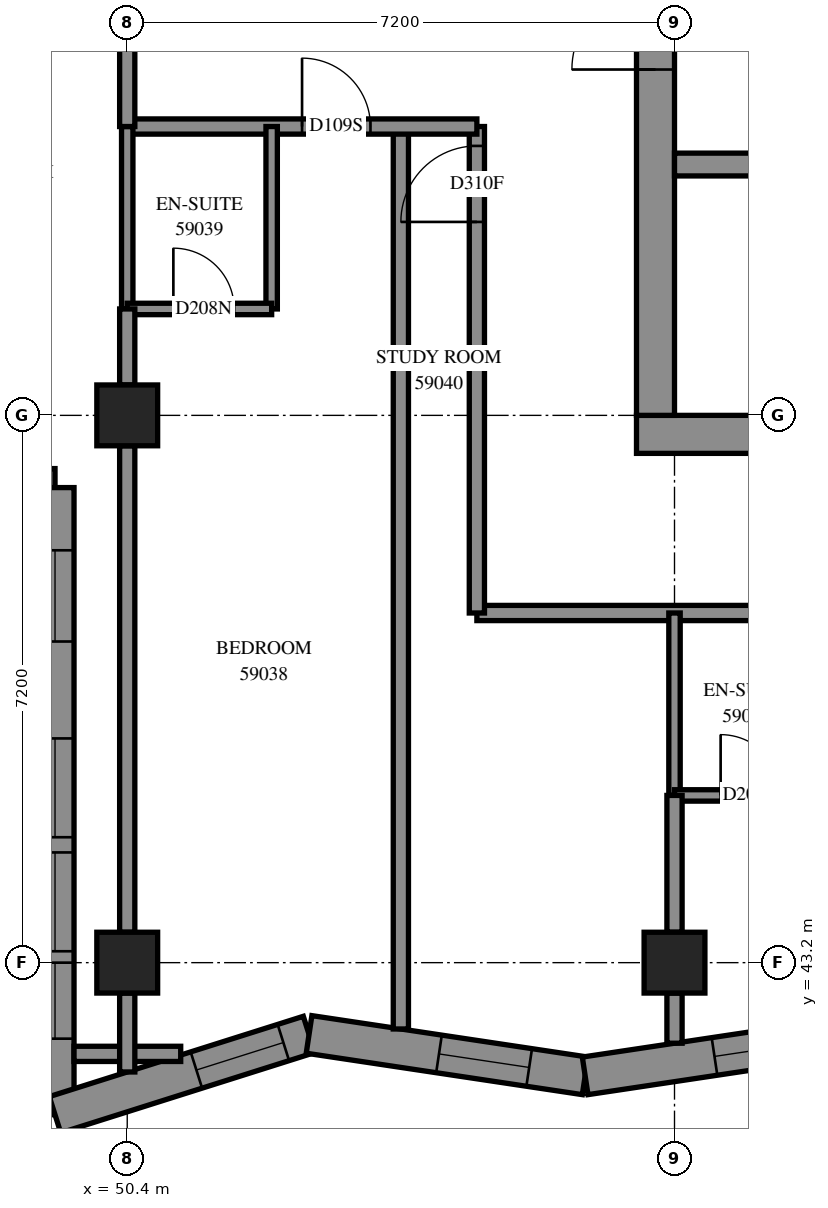
"""IFC4 building model, lengths in metres.
Left out: names, types, materials, properties, quantities, classifications, styles, units other than length and angle.
Written with IfcOpenShell. Run it as: python <this file> out.ifc"""

import sys

from ifc_helpers import new_model, si_unit, direction, frame, frame_2d, origin, origin_2d, place, context, subcontext, project, spatial, polyline, rectangle, outline, extrude, element, fill, save


model = new_model("IFC4")
c1 = context("Model", 3, precision=1e-05, world=origin(), true_north=direction((0.0, 1.0)))
c2 = subcontext(c1, "Body", "Model", "MODEL_VIEW")
j1 = project(units=[si_unit("LENGTHUNIT", "METRE"), si_unit("PLANEANGLEUNIT", "RADIAN")], contexts=[c1])
p1 = place(None, origin())
s1 = spatial("IfcSite", under=j1, at=p1, CompositionType="ELEMENT")
p2 = place(p1, origin())
s2 = spatial("IfcBuilding", under=s1, at=p2, CompositionType="ELEMENT")
p3 = place(p2, frame((0.0, 0.0, 216.8)))
s3 = spatial("IfcBuildingStorey", under=s2, at=p3, CompositionType="ELEMENT", Elevation=216.8)
for number, where, z_axis, x_axis in (
    (1, (50.4, 43.2, 0.0), (0.0, 0.0, 1.0), (1.0, 0.0, 0.0)),
    (2, (50.4, 50.4, 0.0), (0.0, 0.0, 1.0), (1.0, 0.0, 0.0)),
    (3, (57.6, 43.2, 0.0), (0.0, 0.0, 1.0), (1.0, 0.0, 0.0)),
):
    element("IfcColumn", number, at=place(p3, frame(where, z_axis=z_axis, x_axis=x_axis)), inside=s3, PredefinedType="COLUMN", context=c2, shape_type="SweptSolid", body=[
        extrude(rectangle(XDim=0.8, YDim=0.8, at=origin_2d()), origin(), (0.0, 0.0, 1.0), 3.1),
    ])
p4 = place(p3, frame((57.1, 50.15, -0.3), z_axis=(0.0, 0.0, 1.0), x_axis=(1.0, 0.0, 0.0)))
e4 = element("IfcWall", 4, at=p4, inside=s3, PredefinedType="SHEAR", context=c2, shape_type="SweptSolid", body=[
    extrude(rectangle(XDim=15.4, YDim=0.5, at=frame_2d((7.7, 0.0))), origin(), (0.0, 0.0, 1.0), 2.7),
])
p5 = place(p3, frame((57.35, 50.4, -0.3), z_axis=(0.0, 0.0, 1.0), x_axis=(0.0, 1.0, 0.0)))
e5 = element("IfcWall", 5, at=p5, inside=s3, PredefinedType="SHEAR", context=c2, shape_type="SweptSolid", body=[
    extrude(rectangle(XDim=14.4, YDim=0.5, at=frame_2d((7.2, 0.0))), origin(), (0.0, 0.0, 1.0), 2.7),
])
p6 = place(p5, frame((4.55, 0.0, 0.3)))
e6 = element("IfcOpeningElement", 6, at=p6, cuts=e5, PredefinedType="OPENING", context=c2, shape_type="SweptSolid", body=[
    extrude(rectangle(XDim=1.1, YDim=2.1, at=frame_2d((0.55, 1.05))), frame((0.0, 0.26, 0.0), z_axis=(0.0, -1.0, 0.0), x_axis=(1.0, 0.0, 0.0)), (0.0, 0.0, 1.0), 0.52),
])
p7 = place(p5, frame((11.35, 0.0, 0.3)))
e7 = element("IfcOpeningElement", 7, at=p7, cuts=e5, PredefinedType="OPENING", context=c2, shape_type="SweptSolid", body=[
    extrude(rectangle(XDim=1.1, YDim=2.1, at=frame_2d((0.55, 1.05))), frame((0.0, 0.26, 0.0), z_axis=(0.0, -1.0, 0.0), x_axis=(1.0, 0.0, 0.0)), (0.0, 0.0, 1.0), 0.52),
])
p8 = place(p3, frame((57.6, 53.7, 0.0), z_axis=(0.0, 0.0, 1.0), x_axis=(1.0, 0.0, 0.0)))
e8 = element("IfcWall", 8, at=p8, inside=s3, PredefinedType="SOLIDWALL", context=c2, shape_type="SweptSolid", body=[
    extrude(rectangle(XDim=14.4, YDim=0.3, at=frame_2d((7.2, 0.0))), origin(), (0.0, 0.0, 1.0), 3.1),
])
p9 = place(p8, frame((1.35, 0.0, 0.0)))
e9 = element("IfcOpeningElement", 9, at=p9, cuts=e8, PredefinedType="OPENING", context=c2, shape_type="SweptSolid", body=[
    extrude(rectangle(XDim=0.9, YDim=2.1, at=frame_2d((0.45, 1.05))), frame((0.0, 0.16, 0.0), z_axis=(0.0, -1.0, 0.0), x_axis=(1.0, 0.0, 0.0)), (0.0, 0.0, 1.0), 0.32),
])
p10 = place(p8, frame((4.95, 0.0, 0.0)))
e10 = element("IfcOpeningElement", 10, at=p10, cuts=e8, PredefinedType="OPENING", context=c2, shape_type="SweptSolid", body=[
    extrude(rectangle(XDim=0.9, YDim=2.1, at=frame_2d((0.45, 1.05))), frame((0.0, 0.16, 0.0), z_axis=(0.0, -1.0, 0.0), x_axis=(1.0, 0.0, 0.0)), (0.0, 0.0, 1.0), 0.32),
])
p11 = place(p8, frame((8.55, 0.0, 0.0)))
e11 = element("IfcOpeningElement", 11, at=p11, cuts=e8, PredefinedType="OPENING", context=c2, shape_type="SweptSolid", body=[
    extrude(rectangle(XDim=0.9, YDim=2.1, at=frame_2d((0.45, 1.05))), frame((0.0, 0.16, 0.0), z_axis=(0.0, -1.0, 0.0), x_axis=(1.0, 0.0, 0.0)), (0.0, 0.0, 1.0), 0.32),
])
p12 = place(p8, frame((12.05, 0.0, 0.0)))
e12 = element("IfcOpeningElement", 12, at=p12, cuts=e8, PredefinedType="OPENING", context=c2, shape_type="SweptSolid", body=[
    extrude(rectangle(XDim=1.1, YDim=2.1, at=frame_2d((0.55, 1.05))), frame((0.0, 0.16, 0.0), z_axis=(0.0, -1.0, 0.0), x_axis=(1.0, 0.0, 0.0)), (0.0, 0.0, 1.0), 0.32),
])
p13 = place(p3, frame((42.25, 49.45, 0.0), z_axis=(0.0, 0.0, 1.0), x_axis=(1.0, 0.0, 0.0)))
e13 = element("IfcWall", 13, at=p13, inside=s3, PredefinedType="SOLIDWALL", context=c2, shape_type="SweptSolid", body=[
    extrude(outline(polyline([(-0.25, -0.25), (6.95, -0.25), (7.45, 0.25), (0.25, 0.25), (-0.25, -0.25)])), origin(), (0.0, 0.0, 1.0), 3.1),
])
p14 = place(p13, frame((1.35, 0.0, 0.45)))
e14 = element("IfcOpeningElement", 14, at=p14, cuts=e13, PredefinedType="OPENING", context=c2, shape_type="SweptSolid", body=[
    extrude(rectangle(XDim=1.3, YDim=2.5, at=frame_2d((0.65, 1.25))), frame((0.0, 0.26, 0.0), z_axis=(0.0, -1.0, 0.0), x_axis=(1.0, 0.0, 0.0)), (0.0, 0.0, 1.0), 0.52),
])
p15 = place(p13, frame((2.85, 0.0, 0.45)))
e15 = element("IfcOpeningElement", 15, at=p15, cuts=e13, PredefinedType="OPENING", context=c2, shape_type="SweptSolid", body=[
    extrude(rectangle(XDim=1.3, YDim=2.5, at=frame_2d((0.65, 1.25))), frame((0.0, 0.26, 0.0), z_axis=(0.0, -1.0, 0.0), x_axis=(1.0, 0.0, 0.0)), (0.0, 0.0, 1.0), 0.52),
])
p16 = place(p13, frame((5.175, 0.0, 0.45)))
e16 = element("IfcOpeningElement", 16, at=p16, cuts=e13, PredefinedType="OPENING", context=c2, shape_type="SweptSolid", body=[
    extrude(rectangle(XDim=1.2, YDim=2.5, at=frame_2d((0.6, 1.25))), frame((0.0, 0.26, 0.0), z_axis=(0.0, -1.0, 0.0), x_axis=(1.0, 0.0, 0.0)), (0.0, 0.0, 1.0), 0.52),
])
p17 = place(p3, frame((49.45, 49.45, 0.0), z_axis=(0.0, 0.0, 1.0), x_axis=(0.0, -1.0, 0.0)))
e17 = element("IfcWall", 17, at=p17, inside=s3, PredefinedType="SOLIDWALL", context=c2, shape_type="SweptSolid", body=[
    extrude(outline(polyline([(0.25, -0.25), (8.592, -0.25), (7.91, 0.25), (-0.25, 0.25), (0.25, -0.25)])), origin(), (0.0, 0.0, 1.0), 3.1),
])
p18 = place(p17, frame((3.3, 0.0, 0.45)))
e18 = element("IfcOpeningElement", 18, at=p18, cuts=e17, PredefinedType="OPENING", context=c2, shape_type="SweptSolid", body=[
    extrude(rectangle(XDim=1.3, YDim=2.5, at=frame_2d((0.65, 1.25))), frame((0.0, 0.26, 0.0), z_axis=(0.0, -1.0, 0.0), x_axis=(1.0, 0.0, 0.0)), (0.0, 0.0, 1.0), 0.52),
])
p19 = place(p17, frame((4.8, 0.0, 0.45)))
e19 = element("IfcOpeningElement", 19, at=p19, cuts=e17, PredefinedType="OPENING", context=c2, shape_type="SweptSolid", body=[
    extrude(rectangle(XDim=1.3, YDim=2.5, at=frame_2d((0.65, 1.25))), frame((0.0, 0.26, 0.0), z_axis=(0.0, -1.0, 0.0), x_axis=(1.0, 0.0, 0.0)), (0.0, 0.0, 1.0), 0.52),
])
p20 = place(p17, frame((0.825, 0.0, 0.45)))
e20 = element("IfcOpeningElement", 20, at=p20, cuts=e17, PredefinedType="OPENING", context=c2, shape_type="SweptSolid", body=[
    extrude(rectangle(XDim=1.2, YDim=2.5, at=frame_2d((0.6, 1.25))), frame((0.0, 0.26, 0.0), z_axis=(0.0, -1.0, 0.0), x_axis=(1.0, 0.0, 0.0)), (0.0, 0.0, 1.0), 0.52),
])
p21 = place(p17, frame((6.25, 0.0, 0.45)))
e21 = element("IfcOpeningElement", 21, at=p21, cuts=e17, PredefinedType="OPENING", context=c2, shape_type="SweptSolid", body=[
    extrude(rectangle(XDim=1.0, YDim=2.5, at=frame_2d((0.5, 1.25))), frame((0.0, 0.26, 0.0), z_axis=(0.0, -1.0, 0.0), x_axis=(1.0, 0.0, 0.0)), (0.0, 0.0, 1.0), 0.52),
])
p22 = place(p3, frame((49.45, 41.199, 0.0), z_axis=(0.0, 0.0, 1.0), x_axis=(0.9534843061, 0.3014426612, 0.0)))
e22 = element("IfcWall", 22, at=p22, inside=s3, PredefinedType="SOLIDWALL", context=c2, shape_type="SweptSolid", body=[
    extrude(outline(polyline([(-0.341, -0.25), (3.447, -0.25), (3.563, 0.25), (0.341, 0.25), (-0.341, -0.25)])), origin(), (0.0, 0.0, 1.0), 3.1),
])
p23 = place(p22, frame((1.951, 0.0, 0.45)))
e23 = element("IfcOpeningElement", 23, at=p23, cuts=e22, PredefinedType="OPENING", context=c2, shape_type="SweptSolid", body=[
    extrude(rectangle(XDim=1.2, YDim=2.5, at=frame_2d((0.6, 1.25))), frame((0.0, 0.26, 0.0), z_axis=(0.0, -1.0, 0.0), x_axis=(1.0, 0.0, 0.0)), (0.0, 0.0, 1.0), 0.52),
])
p24 = place(p3, frame((52.792, 42.256, 0.0), z_axis=(0.0, 0.0, 1.0), x_axis=(0.9889307607, -0.1483777295, 0.0)))
e24 = element("IfcWall", 24, at=p24, inside=s3, PredefinedType="SOLIDWALL", context=c2, shape_type="SweptSolid", body=[
    extrude(outline(polyline([(0.058, -0.25), (3.711, -0.25), (3.635, 0.25), (-0.058, 0.25), (0.058, -0.25)])), origin(), (0.0, 0.0, 1.0), 3.1),
])
p25 = place(p24, frame((1.728, 0.0, 0.45)))
e25 = element("IfcOpeningElement", 25, at=p25, cuts=e24, PredefinedType="OPENING", context=c2, shape_type="SweptSolid", body=[
    extrude(rectangle(XDim=1.2, YDim=2.5, at=frame_2d((0.6, 1.25))), frame((0.0, 0.26, 0.0), z_axis=(0.0, -1.0, 0.0), x_axis=(1.0, 0.0, 0.0)), (0.0, 0.0, 1.0), 0.52),
])
p26 = place(p3, frame((56.425, 41.711, 0.0), z_axis=(0.0, 0.0, 1.0), x_axis=(0.9889295242, 0.1483859704, 0.0)))
e26 = element("IfcWall", 26, at=p26, inside=s3, PredefinedType="SOLIDWALL", context=c2, shape_type="SweptSolid", body=[
    extrude(outline(polyline([(-0.037, -0.25), (3.615, -0.25), (3.69, 0.25), (0.037, 0.25), (-0.037, -0.25)])), origin(), (0.0, 0.0, 1.0), 3.1),
])
p27 = place(p26, frame((1.721, 0.0, 0.45)))
e27 = element("IfcOpeningElement", 27, at=p27, cuts=e26, PredefinedType="OPENING", context=c2, shape_type="SweptSolid", body=[
    extrude(rectangle(XDim=1.2, YDim=2.5, at=frame_2d((0.6, 1.25))), frame((0.0, 0.26, 0.0), z_axis=(0.0, -1.0, 0.0), x_axis=(1.0, 0.0, 0.0)), (0.0, 0.0, 1.0), 0.52),
])
p28 = place(p3, frame((55.0, 47.8, 0.0), z_axis=(0.0, 0.0, 1.0), x_axis=(1.0, 0.0, 0.0)))
e28 = element("IfcWall", 28, at=p28, inside=s3, PredefinedType="PARTITIONING", context=c2, shape_type="SweptSolid", body=[
    extrude(rectangle(XDim=19.266, YDim=0.2, at=frame_2d((9.633, 0.0))), origin(), (0.0, 0.0, 1.0), 3.1),
])
p29 = place(p28, frame((4.9, 0.0, 0.0)))
e29 = element("IfcOpeningElement", 29, at=p29, cuts=e28, PredefinedType="OPENING", context=c2, shape_type="SweptSolid", body=[
    extrude(rectangle(XDim=0.9, YDim=2.1, at=frame_2d((0.45, 1.05))), frame((0.0, 0.11, 0.0), z_axis=(0.0, -1.0, 0.0), x_axis=(1.0, 0.0, 0.0)), (0.0, 0.0, 1.0), 0.22),
])
p30 = place(p28, frame((8.457, 0.0, 0.0)))
e30 = element("IfcOpeningElement", 30, at=p30, cuts=e28, PredefinedType="OPENING", context=c2, shape_type="SweptSolid", body=[
    extrude(rectangle(XDim=0.9, YDim=2.1, at=frame_2d((0.45, 1.05))), frame((0.0, 0.11, 0.0), z_axis=(0.0, -1.0, 0.0), x_axis=(1.0, 0.0, 0.0)), (0.0, 0.0, 1.0), 0.22),
])
p31 = place(p28, frame((13.8, 0.0, 0.0)))
e31 = element("IfcOpeningElement", 31, at=p31, cuts=e28, PredefinedType="OPENING", context=c2, shape_type="SweptSolid", body=[
    extrude(rectangle(XDim=0.9, YDim=2.1, at=frame_2d((0.45, 1.05))), frame((0.0, 0.11, 0.0), z_axis=(0.0, -1.0, 0.0), x_axis=(1.0, 0.0, 0.0)), (0.0, 0.0, 1.0), 0.22),
])
p32 = place(p3, frame((54.0, 42.327, 0.0), z_axis=(0.0, 0.0, 1.0), x_axis=(0.0, 1.0, 0.0)))
e32 = element("IfcWall", 32, at=p32, inside=s3, PredefinedType="PARTITIONING", context=c2, shape_type="SweptSolid", body=[
    extrude(rectangle(XDim=11.873, YDim=0.2, at=frame_2d((5.936, 0.0))), origin(), (0.0, 0.0, 1.0), 3.1),
])
p33 = place(p3, frame((55.0, 47.8, 0.0), z_axis=(0.0, 0.0, 1.0), x_axis=(0.0, 1.0, 0.0)))
e33 = element("IfcWall", 33, at=p33, inside=s3, PredefinedType="PARTITIONING", context=c2, shape_type="SweptSolid", body=[
    extrude(rectangle(XDim=6.4, YDim=0.2, at=frame_2d((3.2, 0.0))), origin(), (0.0, 0.0, 1.0), 3.1),
])
p34 = place(p33, frame((5.145, 0.0, 0.0)))
e34 = element("IfcOpeningElement", 34, at=p34, cuts=e33, PredefinedType="OPENING", context=c2, shape_type="SweptSolid", body=[
    extrude(rectangle(XDim=1.0, YDim=2.1, at=frame_2d((0.5, 1.05))), frame((0.0, 0.11, 0.0), z_axis=(0.0, -1.0, 0.0), x_axis=(1.0, 0.0, 0.0)), (0.0, 0.0, 1.0), 0.22),
])
p35 = place(p3, frame((50.4, 43.6, 0.0), z_axis=(0.0, 0.0, 1.0), x_axis=(0.0, 1.0, 0.0)))
e35 = element("IfcWall", 35, at=p35, inside=s3, PredefinedType="PARTITIONING", context=c2, shape_type="SweptSolid", body=[
    extrude(rectangle(XDim=6.4, YDim=0.2, at=frame_2d((3.2, 0.0))), origin(), (0.0, 0.0, 1.0), 2.6),
])
p36 = place(p3, frame((50.4, 54.2, 0.0), z_axis=(0.0, 0.0, 1.0), x_axis=(1.0, 0.0, 0.0)))
e36 = element("IfcWall", 36, at=p36, inside=s3, PredefinedType="PARTITIONING", context=c2, shape_type="SweptSolid", body=[
    extrude(rectangle(XDim=4.6, YDim=0.2, at=frame_2d((2.3, 0.0))), origin(), (0.0, 0.0, 1.0), 3.1),
])
p37 = place(p36, frame((2.3, 0.0, 0.0)))
e37 = element("IfcOpeningElement", 37, at=p37, cuts=e36, PredefinedType="OPENING", context=c2, shape_type="SweptSolid", body=[
    extrude(rectangle(XDim=0.9, YDim=2.1, at=frame_2d((0.45, 1.05))), frame((0.0, 0.11, 0.0), z_axis=(0.0, -1.0, 0.0), x_axis=(1.0, 0.0, 0.0)), (0.0, 0.0, 1.0), 0.22),
])
for number, where, z_axis, x_axis in (
    (38, (52.3, 51.8, 0.0), (0.0, 0.0, 1.0), (0.0, 1.0, 0.0)),
    (39, (50.4, 51.8, 0.0), (0.0, 0.0, 1.0), (0.0, 1.0, 0.0)),
    (40, (57.6, 45.4, 0.0), (0.0, 0.0, 1.0), (0.0, 1.0, 0.0)),
):
    element("IfcWall", number, at=place(p3, frame(where, z_axis=z_axis, x_axis=x_axis)), inside=s3, PredefinedType="PARTITIONING", context=c2, shape_type="SweptSolid", body=[
        extrude(rectangle(XDim=2.4, YDim=0.15, at=frame_2d((1.2, 0.0))), origin(), (0.0, 0.0, 1.0), 3.1),
    ])
p38 = place(p3, frame((50.4, 54.2, 0.0), z_axis=(0.0, 0.0, 1.0), x_axis=(0.0, 1.0, 0.0)))
e41 = element("IfcWall", 41, at=p38, inside=s3, PredefinedType="PARTITIONING", context=c2, shape_type="SweptSolid", body=[
    extrude(rectangle(XDim=2.0, YDim=0.2, at=frame_2d((1.0, 0.0))), origin(), (0.0, 0.0, 1.0), 3.1),
])
p39 = place(p3, frame((50.4, 51.8, 0.0), z_axis=(0.0, 0.0, 1.0), x_axis=(1.0, 0.0, 0.0)))
e42 = element("IfcWall", 42, at=p39, inside=s3, PredefinedType="PARTITIONING", context=c2, shape_type="SweptSolid", body=[
    extrude(rectangle(XDim=1.9, YDim=0.15, at=frame_2d((0.95, 0.0))), origin(), (0.0, 0.0, 1.0), 3.1),
])
p40 = place(p39, frame((0.607, 0.0, 0.0)))
e43 = element("IfcOpeningElement", 43, at=p40, cuts=e42, PredefinedType="OPENING", context=c2, shape_type="SweptSolid", body=[
    extrude(rectangle(XDim=0.8, YDim=2.1, at=frame_2d((0.4, 1.05))), frame((0.0, 0.085, 0.0), z_axis=(0.0, -1.0, 0.0), x_axis=(1.0, 0.0, 0.0)), (0.0, 0.0, 1.0), 0.17),
])
p41 = place(p3, frame((57.6, 45.4, 0.0), z_axis=(0.0, 0.0, 1.0), x_axis=(1.0, 0.0, 0.0)))
e44 = element("IfcWall", 44, at=p41, inside=s3, PredefinedType="PARTITIONING", context=c2, shape_type="SweptSolid", body=[
    extrude(rectangle(XDim=1.9, YDim=0.15, at=frame_2d((0.95, 0.0))), origin(), (0.0, 0.0, 1.0), 3.1),
])
p42 = place(p41, frame((0.607, 0.0, 0.0)))
e45 = element("IfcOpeningElement", 45, at=p42, cuts=e44, PredefinedType="OPENING", context=c2, shape_type="SweptSolid", body=[
    extrude(rectangle(XDim=0.8, YDim=2.1, at=frame_2d((0.4, 1.05))), frame((0.0, 0.085, 0.0), z_axis=(0.0, -1.0, 0.0), x_axis=(1.0, 0.0, 0.0)), (0.0, 0.0, 1.0), 0.17),
])
p43 = place(p3, frame((57.6, 43.6, 0.0), z_axis=(0.0, 0.0, 1.0), x_axis=(0.0, 1.0, 0.0)))
e46 = element("IfcWall", 46, at=p43, inside=s3, PredefinedType="PARTITIONING", context=c2, shape_type="SweptSolid", body=[
    extrude(rectangle(XDim=1.8, YDim=0.2, at=frame_2d((0.9, 0.0))), origin(), (0.0, 0.0, 1.0), 3.1),
])
p44 = place(p3, frame((49.7, 42.0, 0.0), z_axis=(0.0, 0.0, 1.0), x_axis=(1.0, 0.0, 0.0)))
e47 = element("IfcWall", 47, at=p44, inside=s3, PredefinedType="PARTITIONING", context=c2, shape_type="SweptSolid", body=[
    extrude(rectangle(XDim=1.403, YDim=0.2, at=frame_2d((0.702, 0.0))), origin(), (0.0, 0.0, 1.0), 3.1),
])
p45 = place(p3, frame((50.4, 50.8, 0.0), z_axis=(0.0, 0.0, 1.0), x_axis=(0.0, 1.0, 0.0)))
e48 = element("IfcWall", 48, at=p45, inside=s3, PredefinedType="PARTITIONING", context=c2, shape_type="SweptSolid", body=[
    extrude(rectangle(XDim=1.0, YDim=0.2, at=frame_2d((0.5, 0.0))), origin(), (0.0, 0.0, 1.0), 3.1),
])
p46 = place(p3, frame((50.4, 41.762, 0.0), z_axis=(0.0, 0.0, 1.0), x_axis=(0.0, 1.0, 0.0)))
e49 = element("IfcWall", 49, at=p46, inside=s3, PredefinedType="PARTITIONING", context=c2, shape_type="SweptSolid", body=[
    extrude(rectangle(XDim=1.038, YDim=0.2, at=frame_2d((0.519, 0.0))), origin(), (0.0, 0.0, 1.0), 3.1),
])
p47 = place(p3, frame((57.6, 42.14, 0.0), z_axis=(0.0, 0.0, 1.0), x_axis=(0.0, 1.0, 0.0)))
e50 = element("IfcWall", 50, at=p47, inside=s3, PredefinedType="PARTITIONING", context=c2, shape_type="SweptSolid", body=[
    extrude(rectangle(XDim=0.66, YDim=0.2, at=frame_2d((0.33, 0.0))), origin(), (0.0, 0.0, 1.0), 3.1),
])
p48 = place(p18, origin())
e51 = element("IfcWindow", 51, at=p48, inside=s3, PartitioningType="SINGLE_PANEL", PredefinedType="WINDOW", context=c2, shape_type="SweptSolid", body=[
    extrude(rectangle(XDim=1.3, YDim=2.5, at=frame_2d((0.65, 1.25))), frame((0.0, 0.18, 0.0), z_axis=(0.0, -1.0, 0.0), x_axis=(1.0, 0.0, 0.0)), (0.0, 0.0, 1.0), 0.06),
])
fill(e18, e51)
p49 = place(p19, origin())
e52 = element("IfcWindow", 52, at=p49, inside=s3, PartitioningType="SINGLE_PANEL", PredefinedType="WINDOW", context=c2, shape_type="SweptSolid", body=[
    extrude(rectangle(XDim=1.3, YDim=2.5, at=frame_2d((0.65, 1.25))), frame((0.0, 0.18, 0.0), z_axis=(0.0, -1.0, 0.0), x_axis=(1.0, 0.0, 0.0)), (0.0, 0.0, 1.0), 0.06),
])
fill(e19, e52)
p50 = place(p20, origin())
e53 = element("IfcWindow", 53, at=p50, inside=s3, PartitioningType="SINGLE_PANEL", PredefinedType="WINDOW", context=c2, shape_type="SweptSolid", body=[
    extrude(rectangle(XDim=1.2, YDim=2.5, at=frame_2d((0.6, 1.25))), frame((0.0, 0.18, 0.0), z_axis=(0.0, -1.0, 0.0), x_axis=(1.0, 0.0, 0.0)), (0.0, 0.0, 1.0), 0.06),
])
fill(e20, e53)
p51 = place(p23, origin())
e54 = element("IfcWindow", 54, at=p51, inside=s3, PartitioningType="SINGLE_PANEL", PredefinedType="WINDOW", context=c2, shape_type="SweptSolid", body=[
    extrude(rectangle(XDim=1.2, YDim=2.5, at=frame_2d((0.6, 1.25))), frame((0.0, 0.18, 0.0), z_axis=(0.0, -1.0, 0.0), x_axis=(1.0, 0.0, 0.0)), (0.0, 0.0, 1.0), 0.06),
])
fill(e23, e54)
p52 = place(p25, origin())
e55 = element("IfcWindow", 55, at=p52, inside=s3, PartitioningType="SINGLE_PANEL", PredefinedType="WINDOW", context=c2, shape_type="SweptSolid", body=[
    extrude(rectangle(XDim=1.2, YDim=2.5, at=frame_2d((0.6, 1.25))), frame((0.0, 0.18, 0.0), z_axis=(0.0, -1.0, 0.0), x_axis=(1.0, 0.0, 0.0)), (0.0, 0.0, 1.0), 0.06),
])
fill(e25, e55)
p53 = place(p27, origin())
e56 = element("IfcWindow", 56, at=p53, inside=s3, PartitioningType="SINGLE_PANEL", PredefinedType="WINDOW", context=c2, shape_type="SweptSolid", body=[
    extrude(rectangle(XDim=1.2, YDim=2.5, at=frame_2d((0.6, 1.25))), frame((0.0, 0.18, 0.0), z_axis=(0.0, -1.0, 0.0), x_axis=(1.0, 0.0, 0.0)), (0.0, 0.0, 1.0), 0.06),
])
fill(e27, e56)
p54 = place(p6, origin())
e57 = element("IfcDoor", 57, at=p54, inside=s3, OperationType="DOUBLE_DOOR_SINGLE_SWING", PredefinedType="DOOR", context=c2, shape_type="SweptSolid", body=[
    extrude(rectangle(XDim=1.1, YDim=2.1, at=frame_2d((0.55, 1.05))), frame((0.0, 0.025, 0.0), z_axis=(0.0, -1.0, 0.0), x_axis=(1.0, 0.0, 0.0)), (0.0, 0.0, 1.0), 0.05),
])
fill(e6, e57)
p55 = place(p37, origin())
e58 = element("IfcDoor", 58, at=p55, inside=s3, OperationType="SINGLE_SWING_LEFT", PredefinedType="DOOR", context=c2, shape_type="SweptSolid", body=[
    extrude(rectangle(XDim=0.9, YDim=2.1, at=frame_2d((0.45, 1.05))), frame((0.0, 0.025, 0.0), z_axis=(0.0, -1.0, 0.0), x_axis=(1.0, 0.0, 0.0)), (0.0, 0.0, 1.0), 0.05),
])
fill(e37, e58)
p56 = place(p40, origin())
e59 = element("IfcDoor", 59, at=p56, inside=s3, OperationType="SINGLE_SWING_RIGHT", PredefinedType="DOOR", context=c2, shape_type="SweptSolid", body=[
    extrude(rectangle(XDim=0.8, YDim=2.1, at=frame_2d((0.4, 1.05))), frame((0.0, 0.025, 0.0), z_axis=(0.0, -1.0, 0.0), x_axis=(1.0, 0.0, 0.0)), (0.0, 0.0, 1.0), 0.05),
])
fill(e43, e59)
p57 = place(p34, origin())
e60 = element("IfcDoor", 60, at=p57, inside=s3, OperationType="SINGLE_SWING_RIGHT", PredefinedType="DOOR", context=c2, shape_type="SweptSolid", body=[
    extrude(rectangle(XDim=1.0, YDim=2.1, at=frame_2d((0.5, 1.05))), frame((0.0, 0.025, 0.0), z_axis=(0.0, -1.0, 0.0), x_axis=(1.0, 0.0, 0.0)), (0.0, 0.0, 1.0), 0.05),
])
fill(e34, e60)
p58 = place(p42, origin())
e61 = element("IfcDoor", 61, at=p58, inside=s3, OperationType="SINGLE_SWING_RIGHT", PredefinedType="DOOR", context=c2, shape_type="SweptSolid", body=[
    extrude(rectangle(XDim=0.8, YDim=2.1, at=frame_2d((0.4, 1.05))), frame((0.0, 0.025, 0.0), z_axis=(0.0, -1.0, 0.0), x_axis=(1.0, 0.0, 0.0)), (0.0, 0.0, 1.0), 0.05),
])
fill(e45, e61)
p59 = place(p21, origin())
e62 = element("IfcWindow", 62, at=p59, inside=s3, PartitioningType="SINGLE_PANEL", PredefinedType="WINDOW", context=c2, shape_type="SweptSolid", body=[
    extrude(rectangle(XDim=1.0, YDim=2.5, at=frame_2d((0.5, 1.25))), frame((0.0, 0.18, 0.0), z_axis=(0.0, -1.0, 0.0), x_axis=(1.0, 0.0, 0.0)), (0.0, 0.0, 1.0), 0.06),
])
fill(e21, e62)
save(model, sys.argv[1])
